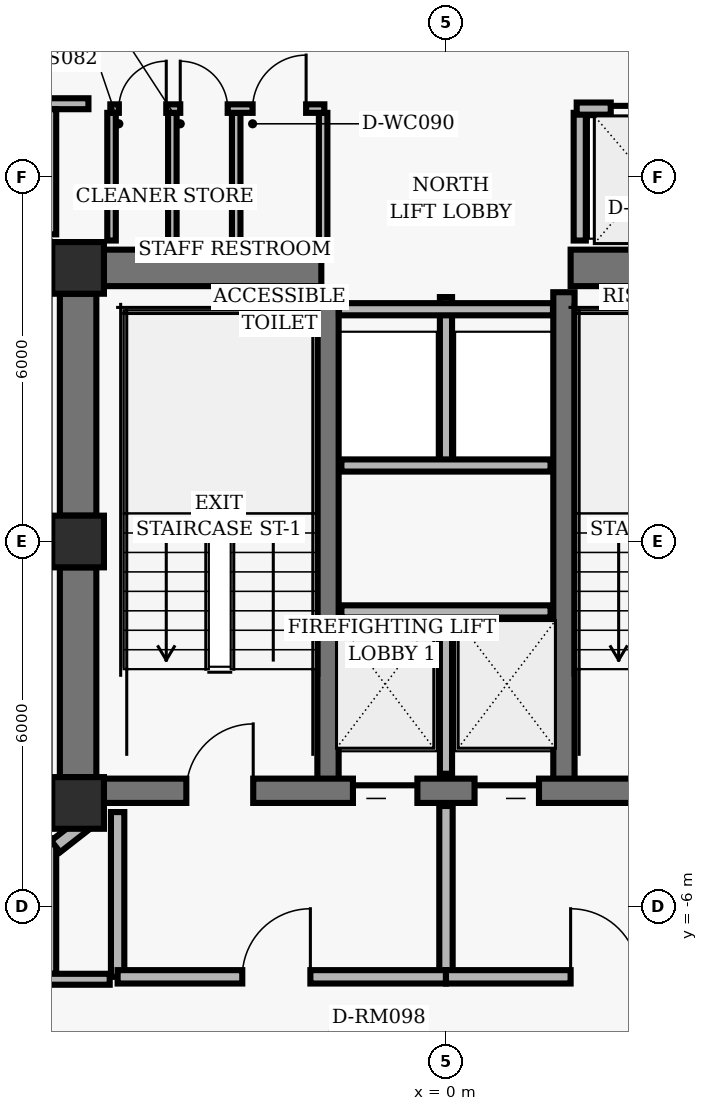
"""IFC4 building model, lengths in metres.
Left out: names, types, materials, properties, quantities, classifications, styles, units other than length and angle.
Written with IfcOpenShell. Run it as: python <this file> out.ifc"""

import sys

from ifc_helpers import new_model, si_unit, direction, frame, frame_2d, origin, origin_2d, place, context, subcontext, project, spatial, rectangle, hollow_rectangle, extrude, element, fill, save


model = new_model("IFC4")
c1 = context("Model", 3, precision=1e-05, world=origin(), true_north=direction((0.0, 1.0)))
c2 = subcontext(c1, "Body", "Model", "MODEL_VIEW")
j1 = project(units=[si_unit("LENGTHUNIT", "METRE"), si_unit("PLANEANGLEUNIT", "RADIAN")], contexts=[c1])
p1 = place(None, origin())
s1 = spatial("IfcSite", under=j1, at=p1, CompositionType="ELEMENT")
p2 = place(p1, origin())
s2 = spatial("IfcBuilding", under=s1, at=p2, CompositionType="ELEMENT")
p3 = place(p2, frame((0.0, 0.0, 110.72)))
s3 = spatial("IfcBuildingStorey", under=s2, at=p3, CompositionType="ELEMENT", Elevation=110.72)
for number, where, z_axis, x_axis in (
    (1, (-6.05, 4.5, 0.0), (0.0, 0.0, 1.0), (1.0, 0.0, 0.0)),
    (2, (-6.05, 0.0, 0.0), (0.0, 0.0, 1.0), (1.0, 0.0, 0.0)),
    (3, (-6.05, -4.3, 0.0), (0.0, 0.0, 1.0), (1.0, 0.0, 0.0)),
):
    element("IfcColumn", number, at=place(p3, frame(where, z_axis=z_axis, x_axis=x_axis)), inside=s3, PredefinedType="COLUMN", context=c2, shape_type="SweptSolid", body=[
        extrude(hollow_rectangle(XDim=0.85, YDim=0.85, WallThickness=0.055, InnerFilletRadius=0.02, OuterFilletRadius=0.04, at=origin_2d()), origin(), (0.0, 0.0, 1.0), 3.04),
    ])
p4 = place(p3, frame((-6.05, 0.425, 0.0), z_axis=(0.0, 0.0, 1.0), x_axis=(0.0, 1.0, 0.0)))
e4 = element("IfcWall", 4, at=p4, inside=s3, PredefinedType="SHEAR", context=c2, shape_type="SweptSolid", body=[
    extrude(rectangle(XDim=3.65, YDim=0.6, at=frame_2d((1.825, 0.0))), origin(), (0.0, 0.0, 1.0), 2.788),
])
p5 = place(p3, frame((-6.05, -3.875, 0.0), z_axis=(0.0, 0.0, 1.0), x_axis=(0.0, 1.0, 0.0)))
e5 = element("IfcWall", 5, at=p5, inside=s3, PredefinedType="SHEAR", context=c2, shape_type="SweptSolid", body=[
    extrude(rectangle(XDim=3.45, YDim=0.6, at=frame_2d((1.725, 0.0))), origin(), (0.0, 0.0, 1.0), 2.788),
])
for number, where, z_axis, x_axis in (
    (6, (-1.94, -4.1, 0.0), (0.0, 0.0, 1.0), (0.0, 1.0, 0.0)),
    (7, (1.94, -4.1, 0.0), (0.0, 0.0, 1.0), (0.0, 1.0, 0.0)),
):
    element("IfcWall", number, at=place(p3, frame(where, z_axis=z_axis, x_axis=x_axis)), inside=s3, PredefinedType="SHEAR", context=c2, shape_type="SweptSolid", body=[
        extrude(rectangle(XDim=8.2, YDim=0.35, at=frame_2d((4.1, 0.0))), origin(), (0.0, 0.0, 1.0), 2.788),
    ])
p6 = place(p3, frame((-5.625, -4.1, 0.0), z_axis=(0.0, 0.0, 1.0), x_axis=(1.0, 0.0, 0.0)))
e8 = element("IfcWall", 8, at=p6, inside=s3, PredefinedType="SHEAR", context=c2, shape_type="SweptSolid", body=[
    extrude(rectangle(XDim=11.25, YDim=0.4, at=frame_2d((5.625, 0.0))), origin(), (0.0, 0.0, 1.0), 2.788),
])
p7 = place(p6, frame((1.355, 0.0, 0.0)))
e9 = element("IfcOpeningElement", 9, at=p7, cuts=e8, PredefinedType="OPENING", context=c2, shape_type="SweptSolid", body=[
    extrude(rectangle(XDim=1.1, YDim=2.04, at=frame_2d((0.55, 1.02))), frame((0.0, 0.21, 0.0), z_axis=(0.0, -1.0, 0.0), x_axis=(1.0, 0.0, 0.0)), (0.0, 0.0, 1.0), 0.42),
])
p8 = place(p6, frame((8.795, 0.0, 0.0)))
e10 = element("IfcOpeningElement", 10, at=p8, cuts=e8, PredefinedType="OPENING", context=c2, shape_type="SweptSolid", body=[
    extrude(rectangle(XDim=1.1, YDim=2.04, at=frame_2d((0.55, 1.02))), frame((0.0, 0.21, 0.0), z_axis=(0.0, -1.0, 0.0), x_axis=(1.0, 0.0, 0.0)), (0.0, 0.0, 1.0), 0.42),
])
p9 = place(p6, frame((4.095, 0.0, 0.0)))
e11 = element("IfcOpeningElement", 11, at=p9, cuts=e8, PredefinedType="OPENING", context=c2, shape_type="SweptSolid", body=[
    extrude(rectangle(XDim=1.06, YDim=2.04, at=frame_2d((0.53, 1.02))), frame((0.0, 0.21, 0.0), z_axis=(0.0, -1.0, 0.0), x_axis=(1.0, 0.0, 0.0)), (0.0, 0.0, 1.0), 0.42),
])
p10 = place(p6, frame((6.095, 0.0, 0.0)))
e12 = element("IfcOpeningElement", 12, at=p10, cuts=e8, PredefinedType="OPENING", context=c2, shape_type="SweptSolid", body=[
    extrude(rectangle(XDim=1.06, YDim=2.04, at=frame_2d((0.53, 1.02))), frame((0.0, 0.21, 0.0), z_axis=(0.0, -1.0, 0.0), x_axis=(1.0, 0.0, 0.0)), (0.0, 0.0, 1.0), 0.42),
])
for number, where, z_axis, x_axis in (
    (13, (-5.625, 4.5, 0.0), (0.0, 0.0, 1.0), (1.0, 0.0, 0.0)),
    (14, (2.05, 4.5, 0.0), (0.0, 0.0, 1.0), (1.0, 0.0, 0.0)),
):
    element("IfcWall", number, at=place(p3, frame(where, z_axis=z_axis, x_axis=x_axis)), inside=s3, PredefinedType="SHEAR", context=c2, shape_type="SweptSolid", body=[
        extrude(rectangle(XDim=3.575, YDim=0.6, at=frame_2d((1.788, 0.0))), origin(), (0.0, 0.0, 1.0), 2.788),
    ])
p11 = place(p3, frame((0.0, -3.82, 0.0), z_axis=(0.0, 0.0, 1.0), x_axis=(0.0, 1.0, 0.0)))
e15 = element("IfcWall", 15, at=p11, inside=s3, PredefinedType="PARTITIONING", context=c2, shape_type="SweptSolid", body=[
    extrude(rectangle(XDim=2.67, YDim=0.2, at=frame_2d((1.335, 0.0))), origin(), (0.0, 0.0, 1.0), 2.763),
])
p12 = place(p3, frame((-1.72, -1.15, 0.0), z_axis=(0.0, 0.0, 1.0), x_axis=(1.0, 0.0, 0.0)))
e16 = element("IfcWall", 16, at=p12, inside=s3, PredefinedType="PARTITIONING", context=c2, shape_type="SweptSolid", body=[
    extrude(rectangle(XDim=3.44, YDim=0.2, at=frame_2d((1.72, 0.0))), origin(), (0.0, 0.0, 1.0), 2.763),
])
p13 = place(p3, frame((-5.4, -7.16, 0.0), z_axis=(0.0, 0.0, 1.0), x_axis=(0.0, 1.0, 0.0)))
e17 = element("IfcWall", 17, at=p13, inside=s3, PredefinedType="PARTITIONING", context=c2, shape_type="SweptSolid", body=[
    extrude(rectangle(XDim=2.71, YDim=0.22, at=frame_2d((1.355, 0.0))), origin(), (0.0, 0.0, 1.0), 2.763),
])
p14 = place(p3, frame((0.0, -7.16, 0.0), z_axis=(0.0, 0.0, 1.0), x_axis=(0.0, 1.0, 0.0)))
e18 = element("IfcWall", 18, at=p14, inside=s3, PredefinedType="PARTITIONING", context=c2, shape_type="SweptSolid", body=[
    extrude(rectangle(XDim=2.81, YDim=0.22, at=frame_2d((1.405, 0.0))), origin(), (0.0, 0.0, 1.0), 2.763),
])
p15 = place(p3, frame((-5.4, -7.16, 0.0), z_axis=(0.0, 0.0, 1.0), x_axis=(1.0, 0.0, 0.0)))
e19 = element("IfcWall", 19, at=p15, inside=s3, PredefinedType="PARTITIONING", context=c2, shape_type="SweptSolid", body=[
    extrude(rectangle(XDim=5.4, YDim=0.22, at=frame_2d((2.7, 0.0))), origin(), (0.0, 0.0, 1.0), 2.33),
])
p16 = place(p15, frame((2.05, 0.0, 0.0)))
e20 = element("IfcOpeningElement", 20, at=p16, cuts=e19, PredefinedType="OPENING", context=c2, shape_type="SweptSolid", body=[
    extrude(rectangle(XDim=1.12, YDim=2.02, at=frame_2d((0.56, 1.01))), frame((0.0, 0.12, 0.0), z_axis=(0.0, -1.0, 0.0), x_axis=(1.0, 0.0, 0.0)), (0.0, 0.0, 1.0), 0.24),
])
p17 = place(p3, frame((0.0, -7.16, 0.0), z_axis=(0.0, 0.0, 1.0), x_axis=(1.0, 0.0, 0.0)))
e21 = element("IfcWall", 21, at=p17, inside=s3, PredefinedType="PARTITIONING", context=c2, shape_type="SweptSolid", body=[
    extrude(rectangle(XDim=5.4, YDim=0.22, at=frame_2d((2.7, 0.0))), origin(), (0.0, 0.0, 1.0), 2.33),
])
p18 = place(p17, frame((2.05, 0.0, 0.0)))
e22 = element("IfcOpeningElement", 22, at=p18, cuts=e21, PredefinedType="OPENING", context=c2, shape_type="SweptSolid", body=[
    extrude(rectangle(XDim=1.12, YDim=2.02, at=frame_2d((0.56, 1.01))), frame((0.0, 0.12, 0.0), z_axis=(0.0, -1.0, 0.0), x_axis=(1.0, 0.0, 0.0)), (0.0, 0.0, 1.0), 0.24),
])
p19 = place(p3, frame((0.0, 1.25, 0.0), z_axis=(0.0, 0.0, 1.0), x_axis=(0.0, 1.0, 0.0)))
e23 = element("IfcWall", 23, at=p19, inside=s3, PredefinedType="PARTITIONING", context=c2, shape_type="SweptSolid", body=[
    extrude(rectangle(XDim=2.77, YDim=0.2, at=frame_2d((1.385, 0.0))), origin(), (0.0, 0.0, 1.0), 2.763),
])
p20 = place(p3, frame((-1.72, 1.25, 0.0), z_axis=(0.0, 0.0, 1.0), x_axis=(1.0, 0.0, 0.0)))
e24 = element("IfcWall", 24, at=p20, inside=s3, PredefinedType="PARTITIONING", context=c2, shape_type="SweptSolid", body=[
    extrude(rectangle(XDim=3.44, YDim=0.2, at=frame_2d((1.72, 0.0))), origin(), (0.0, 0.0, 1.0), 2.763),
])
p21 = place(p3, frame((-1.76, 3.82, 0.0), z_axis=(0.0, 0.0, 1.0), x_axis=(1.0, 0.0, 0.0)))
e25 = element("IfcWall", 25, at=p21, inside=s3, PredefinedType="PARTITIONING", context=c2, shape_type="SweptSolid", body=[
    extrude(rectangle(XDim=3.52, YDim=0.2, at=frame_2d((1.76, 0.0))), origin(), (0.0, 0.0, 1.0), 2.763),
])
p22 = place(p3, frame((2.2, 4.95, 0.0), z_axis=(0.0, 0.0, 1.0), x_axis=(0.0, 1.0, 0.0)))
e26 = element("IfcWall", 26, at=p22, inside=s3, PredefinedType="PARTITIONING", context=c2, shape_type="SweptSolid", body=[
    extrude(rectangle(XDim=2.1, YDim=0.2, at=frame_2d((1.05, 0.0))), origin(), (0.0, 0.0, 1.0), 2.132),
])
p23 = place(p3, frame((2.15, 7.12, 0.0), z_axis=(0.0, 0.0, 1.0), x_axis=(1.0, 0.0, 0.0)))
e27 = element("IfcWall", 27, at=p23, inside=s3, PredefinedType="PARTITIONING", context=c2, shape_type="SweptSolid", body=[
    extrude(rectangle(XDim=2.38, YDim=0.2, at=frame_2d((1.19, 0.0))), origin(), (0.0, 0.0, 1.0), 2.763),
])
p24 = place(p23, frame((0.56, 0.0, 0.0)))
e28 = element("IfcOpeningElement", 28, at=p24, cuts=e27, PredefinedType="OPENING", context=c2, shape_type="SweptSolid", body=[
    extrude(rectangle(XDim=1.26, YDim=2.06, at=frame_2d((0.63, 1.03))), frame((0.0, 0.11, 0.0), z_axis=(0.0, -1.0, 0.0), x_axis=(1.0, 0.0, 0.0)), (0.0, 0.0, 1.0), 0.22),
])
for number, where, z_axis, x_axis in (
    (29, (-5.5, 4.95, 0.0), (0.0, 0.0, 1.0), (0.0, 1.0, 0.0)),
    (30, (-4.5, 4.95, 0.0), (0.0, 0.0, 1.0), (0.0, 1.0, 0.0)),
    (31, (-3.45, 4.95, 0.0), (0.0, 0.0, 1.0), (0.0, 1.0, 0.0)),
    (32, (-2.02, 4.95, 0.0), (0.0, 0.0, 1.0), (0.0, 1.0, 0.0)),
):
    element("IfcWall", number, at=place(p3, frame(where, z_axis=z_axis, x_axis=x_axis)), inside=s3, PredefinedType="PARTITIONING", context=c2, shape_type="SweptSolid", body=[
        extrude(rectangle(XDim=2.1, YDim=0.14, at=frame_2d((1.05, 0.0))), origin(), (0.0, 0.0, 1.0), 2.763),
    ])
p25 = place(p3, frame((-5.52, 7.12, 0.0), z_axis=(0.0, 0.0, 1.0), x_axis=(1.0, 0.0, 0.0)))
e33 = element("IfcWall", 33, at=p25, inside=s3, PredefinedType="PARTITIONING", context=c2, shape_type="SweptSolid", body=[
    extrude(rectangle(XDim=3.52, YDim=0.14, at=frame_2d((1.76, 0.0))), origin(), (0.0, 0.0, 1.0), 2.763),
])
p26 = place(p25, frame((0.14, 0.0, 0.0)))
e34 = element("IfcOpeningElement", 34, at=p26, cuts=e33, PredefinedType="OPENING", context=c2, shape_type="SweptSolid", body=[
    extrude(rectangle(XDim=0.78, YDim=2.01, at=frame_2d((0.39, 1.005))), frame((0.0, 0.08, 0.0), z_axis=(0.0, -1.0, 0.0), x_axis=(1.0, 0.0, 0.0)), (0.0, 0.0, 1.0), 0.16),
])
p27 = place(p25, frame((1.15, 0.0, 0.0)))
e35 = element("IfcOpeningElement", 35, at=p27, cuts=e33, PredefinedType="OPENING", context=c2, shape_type="SweptSolid", body=[
    extrude(rectangle(XDim=0.78, YDim=2.01, at=frame_2d((0.39, 1.005))), frame((0.0, 0.08, 0.0), z_axis=(0.0, -1.0, 0.0), x_axis=(1.0, 0.0, 0.0)), (0.0, 0.0, 1.0), 0.16),
])
p28 = place(p25, frame((2.34, 0.0, 0.0)))
e36 = element("IfcOpeningElement", 36, at=p28, cuts=e33, PredefinedType="OPENING", context=c2, shape_type="SweptSolid", body=[
    extrude(rectangle(XDim=0.88, YDim=2.02, at=frame_2d((0.44, 1.01))), frame((0.0, 0.08, 0.0), z_axis=(0.0, -1.0, 0.0), x_axis=(1.0, 0.0, 0.0)), (0.0, 0.0, 1.0), 0.16),
])
p29 = place(p3, frame((-5.88, 7.2, 0.0), z_axis=(0.0, 0.0, 1.0), x_axis=(-1.0, 0.0, 0.0)))
e37 = element("IfcWall", 37, at=p29, inside=s3, PredefinedType="PARTITIONING", context=c2, shape_type="SweptSolid", body=[
    extrude(rectangle(XDim=0.71, YDim=0.18, at=frame_2d((0.355, 0.0))), origin(), (0.0, 0.0, 1.0), 2.763),
])
p30 = place(p3, frame((-6.5, 7.11, 0.0), z_axis=(0.0, 0.0, 1.0), x_axis=(0.0, -1.0, 0.0)))
e38 = element("IfcWall", 38, at=p30, inside=s3, PredefinedType="PARTITIONING", context=c2, shape_type="SweptSolid", body=[
    extrude(rectangle(XDim=2.058, YDim=0.18, at=frame_2d((1.029, 0.0))), origin(), (0.0, 0.0, 1.0), 2.763),
])
p31 = place(p3, frame((-6.5, -4.88, 0.0), z_axis=(0.0, 0.0, 1.0), x_axis=(0.0, -1.0, 0.0)))
e39 = element("IfcWall", 39, at=p31, inside=s3, PredefinedType="PARTITIONING", context=c2, shape_type="SweptSolid", body=[
    extrude(rectangle(XDim=2.23, YDim=0.18, at=frame_2d((1.115, 0.0))), origin(), (0.0, 0.0, 1.0), 2.763),
])
p32 = place(p3, frame((-6.59, -7.2, 0.0), z_axis=(0.0, 0.0, 1.0), x_axis=(1.0, 0.0, 0.0)))
e40 = element("IfcWall", 40, at=p32, inside=s3, PredefinedType="PARTITIONING", context=c2, shape_type="SweptSolid", body=[
    extrude(rectangle(XDim=1.06, YDim=0.18, at=frame_2d((0.53, 0.0))), origin(), (0.0, 0.0, 1.0), 2.33),
])
p33 = place(p3, frame((-5.836, -4.56, 0.0), z_axis=(0.0, 0.0, 1.0), x_axis=(-0.788054366409, -0.615605649408, 0.0)))
e41 = element("IfcWall", 41, at=p33, inside=s3, PredefinedType="PARTITIONING", context=c2, shape_type="SweptSolid", body=[
    extrude(rectangle(XDim=0.74, YDim=0.24, at=frame_2d((0.37, 0.0))), origin(), (0.0, 0.0, 1.0), 2.132),
])
p34 = place(p7, origin())
e42 = element("IfcDoor", 42, at=p34, inside=s3, OperationType="SINGLE_SWING_RIGHT", PredefinedType="DOOR", context=c2, shape_type="SweptSolid", body=[
    extrude(rectangle(XDim=1.1, YDim=2.04, at=frame_2d((0.55, 1.02))), frame((0.0, 0.025, 0.0), z_axis=(0.0, -1.0, 0.0), x_axis=(1.0, 0.0, 0.0)), (0.0, 0.0, 1.0), 0.05),
])
fill(e9, e42)
p35 = place(p9, origin())
e43 = element("IfcDoor", 43, at=p35, inside=s3, OperationType="SLIDING_TO_LEFT", PredefinedType="DOOR", context=c2, shape_type="SweptSolid", body=[
    extrude(rectangle(XDim=1.06, YDim=2.04, at=frame_2d((0.53, 1.02))), frame((0.0, 0.025, 0.0), z_axis=(0.0, -1.0, 0.0), x_axis=(1.0, 0.0, 0.0)), (0.0, 0.0, 1.0), 0.05),
])
fill(e11, e43)
p36 = place(p10, origin())
e44 = element("IfcDoor", 44, at=p36, inside=s3, OperationType="SLIDING_TO_RIGHT", PredefinedType="DOOR", context=c2, shape_type="SweptSolid", body=[
    extrude(rectangle(XDim=1.06, YDim=2.04, at=frame_2d((0.53, 1.02))), frame((0.0, 0.025, 0.0), z_axis=(0.0, -1.0, 0.0), x_axis=(1.0, 0.0, 0.0)), (0.0, 0.0, 1.0), 0.05),
])
fill(e12, e44)
p37 = place(p16, origin())
e45 = element("IfcDoor", 45, at=p37, inside=s3, OperationType="SINGLE_SWING_RIGHT", PredefinedType="DOOR", context=c2, shape_type="SweptSolid", body=[
    extrude(rectangle(XDim=1.12, YDim=2.02, at=frame_2d((0.56, 1.01))), frame((0.0, 0.025, 0.0), z_axis=(0.0, -1.0, 0.0), x_axis=(1.0, 0.0, 0.0)), (0.0, 0.0, 1.0), 0.05),
])
fill(e20, e45)
p38 = place(p18, origin())
e46 = element("IfcDoor", 46, at=p38, inside=s3, OperationType="SINGLE_SWING_LEFT", PredefinedType="DOOR", context=c2, shape_type="SweptSolid", body=[
    extrude(rectangle(XDim=1.12, YDim=2.02, at=frame_2d((0.56, 1.01))), frame((0.0, 0.025, 0.0), z_axis=(0.0, -1.0, 0.0), x_axis=(1.0, 0.0, 0.0)), (0.0, 0.0, 1.0), 0.05),
])
fill(e22, e46)
p39 = place(p24, origin())
e47 = element("IfcDoor", 47, at=p39, inside=s3, OperationType="SLIDING_TO_LEFT", PredefinedType="DOOR", context=c2, shape_type="SweptSolid", body=[
    extrude(rectangle(XDim=1.26, YDim=2.06, at=frame_2d((0.63, 1.03))), frame((0.0, 0.025, 0.0), z_axis=(0.0, -1.0, 0.0), x_axis=(1.0, 0.0, 0.0)), (0.0, 0.0, 1.0), 0.05),
])
fill(e28, e47)
p40 = place(p26, origin())
e48 = element("IfcDoor", 48, at=p40, inside=s3, OperationType="SINGLE_SWING_RIGHT", PredefinedType="DOOR", context=c2, shape_type="SweptSolid", body=[
    extrude(rectangle(XDim=0.78, YDim=2.01, at=frame_2d((0.39, 1.005))), frame((0.0, 0.025, 0.0), z_axis=(0.0, -1.0, 0.0), x_axis=(1.0, 0.0, 0.0)), (0.0, 0.0, 1.0), 0.05),
])
fill(e34, e48)
p41 = place(p27, origin())
e49 = element("IfcDoor", 49, at=p41, inside=s3, OperationType="SINGLE_SWING_LEFT", PredefinedType="DOOR", context=c2, shape_type="SweptSolid", body=[
    extrude(rectangle(XDim=0.78, YDim=2.01, at=frame_2d((0.39, 1.005))), frame((0.0, 0.025, 0.0), z_axis=(0.0, -1.0, 0.0), x_axis=(1.0, 0.0, 0.0)), (0.0, 0.0, 1.0), 0.05),
])
fill(e35, e49)
p42 = place(p28, origin())
e50 = element("IfcDoor", 50, at=p42, inside=s3, OperationType="SINGLE_SWING_RIGHT", PredefinedType="DOOR", context=c2, shape_type="SweptSolid", body=[
    extrude(rectangle(XDim=0.88, YDim=2.02, at=frame_2d((0.44, 1.01))), frame((0.0, 0.025, 0.0), z_axis=(0.0, -1.0, 0.0), x_axis=(1.0, 0.0, 0.0)), (0.0, 0.0, 1.0), 0.05),
])
fill(e36, e50)
save(model, sys.argv[1])
